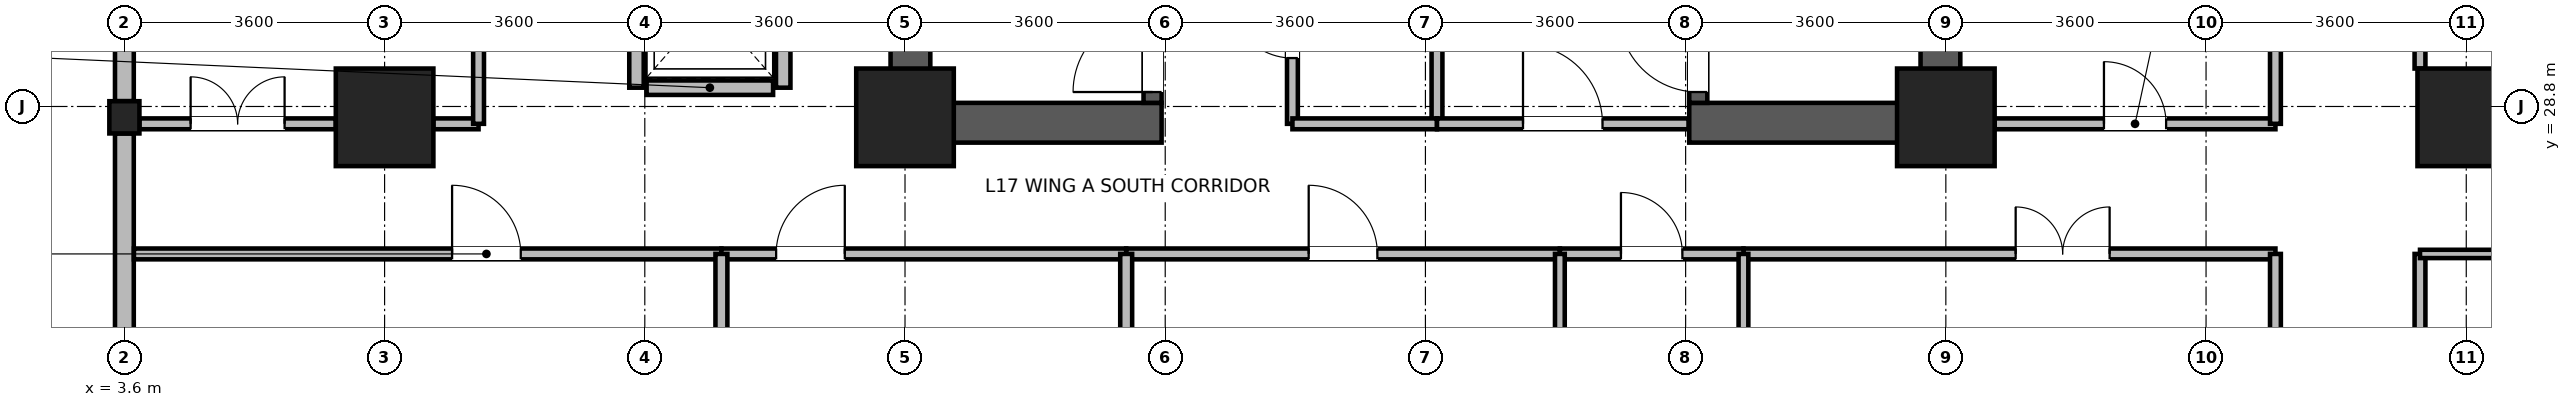
"""IFC4 building model, lengths in metres.
Left out: names, types, materials, properties, quantities, classifications, styles, units other than length and angle.
Written with IfcOpenShell. Run it as: python <this file> out.ifc"""

import sys

from ifc_helpers import new_model, si_unit, direction, frame, frame_2d, origin, origin_2d, place, context, subcontext, project, spatial, rectangle, i_section, extrude, source, transform, mapped, element, fill, save


model = new_model("IFC4")
c1 = context("Model", 3, precision=1e-05, world=origin(), true_north=direction((0.0, 1.0)))
c2 = subcontext(c1, "Body", "Model", "MODEL_VIEW")
j1 = project(units=[si_unit("LENGTHUNIT", "METRE"), si_unit("PLANEANGLEUNIT", "RADIAN")], contexts=[c1])
p1 = place(None, origin())
s1 = spatial("IfcSite", under=j1, at=p1, CompositionType="ELEMENT")
p2 = place(p1, origin())
s2 = spatial("IfcBuilding", under=s1, at=p2, CompositionType="ELEMENT")
p3 = place(p2, frame((0.0, 0.0, 69.7)))
s3 = spatial("IfcBuildingStorey", under=s2, at=p3, CompositionType="ELEMENT", Elevation=69.7)
for number, where, z_axis, x_axis in (
    (1, (14.475, 28.3, 0.0), (0.0, 0.0, 1.0), (0.0, 1.0, 0.0)),
    (2, (28.725, 28.3, 0.0), (0.0, 0.0, 1.0), (0.0, 1.0, 0.0)),
):
    element("IfcWall", number, at=place(p3, frame(where, z_axis=z_axis, x_axis=x_axis)), inside=s3, PredefinedType="SHEAR", context=c2, shape_type="SweptSolid", body=[
        extrude(rectangle(XDim=8.1, YDim=0.55, at=frame_2d((4.05, 0.0))), origin(), (0.0, 0.0, 1.0), 3.34),
    ])
for number, where, z_axis, x_axis in (
    (3, (14.75, 28.575, 0.0), (0.0, 0.0, 1.0), (1.0, 0.0, 0.0)),
    (4, (25.25, 28.575, 0.0), (0.0, 0.0, 1.0), (1.0, 0.0, 0.0)),
):
    element("IfcWall", number, at=place(p3, frame(where, z_axis=z_axis, x_axis=x_axis)), inside=s3, PredefinedType="SHEAR", context=c2, shape_type="SweptSolid", body=[
        extrude(rectangle(XDim=3.2, YDim=0.55, at=frame_2d((1.6, 0.0))), origin(), (0.0, 0.0, 1.0), 3.34),
    ])
p4 = place(p3, frame((17.825, 28.85, 0.0), z_axis=(0.0, 0.0, 1.0), x_axis=(0.0, 1.0, 0.0)))
e5 = element("IfcWall", 5, at=p4, inside=s3, PredefinedType="SHEAR", context=c2, shape_type="SweptSolid", body=[
    extrude(rectangle(XDim=7.0, YDim=0.25, at=frame_2d((3.5, 0.0))), origin(), (0.0, 0.0, 1.0), 3.34),
])
p5 = place(p4, frame((0.15, 0.0, 0.0)))
e6 = element("IfcOpeningElement", 6, at=p5, cuts=e5, PredefinedType="OPENING", context=c2, shape_type="SweptSolid", body=[
    extrude(rectangle(XDim=1.1, YDim=2.08, at=frame_2d((0.55, 1.04))), frame((0.0, 0.135, 0.0), z_axis=(0.0, -1.0, 0.0), x_axis=(1.0, 0.0, 0.0)), (0.0, 0.0, 1.0), 0.27),
])
p6 = place(p3, frame((25.375, 28.85, 0.0), z_axis=(0.0, 0.0, 1.0), x_axis=(0.0, 1.0, 0.0)))
e7 = element("IfcWall", 7, at=p6, inside=s3, PredefinedType="SHEAR", context=c2, shape_type="SweptSolid", body=[
    extrude(rectangle(XDim=7.0, YDim=0.25, at=frame_2d((3.5, 0.0))), origin(), (0.0, 0.0, 1.0), 3.34),
])
p7 = place(p6, frame((0.15, 0.0, 0.0)))
e8 = element("IfcOpeningElement", 8, at=p7, cuts=e7, PredefinedType="OPENING", context=c2, shape_type="SweptSolid", body=[
    extrude(rectangle(XDim=1.1, YDim=2.08, at=frame_2d((0.55, 1.04))), frame((0.0, 0.135, 0.0), z_axis=(0.0, -1.0, 0.0), x_axis=(1.0, 0.0, 0.0)), (0.0, 0.0, 1.0), 0.27),
])
m1 = source(origin(), c2, "Body", "SweptSolid", [
    extrude(rectangle(XDim=1.35, YDim=1.35, at=origin_2d()), origin(), (0.0, 0.0, 1.0), 3.7),
])
for number, where, z_axis, x_axis in (
    (9, (7.2, 28.65, 0.0), (0.0, 0.0, 1.0), (1.0, 0.0, 0.0)),
    (10, (14.4, 28.65, 0.0), (0.0, 0.0, 1.0), (1.0, 0.0, 0.0)),
    (11, (28.8, 28.65, 0.0), (0.0, 0.0, 1.0), (1.0, 0.0, 0.0)),
    (12, (36.0, 28.65, 0.0), (0.0, 0.0, 1.0), (1.0, 0.0, 0.0)),
):
    element("IfcColumn", number, at=place(p3, frame(where, z_axis=z_axis, x_axis=x_axis)), inside=s3, PredefinedType="COLUMN", context=c2, shape_type="MappedRepresentation", body=[
        mapped(m1, transform((0.0, 0.0, 0.0), x_axis=(1.0, 0.0, 0.0), y_axis=(0.0, 1.0, 0.0), z_axis=(0.0, 0.0, 1.0), scale=1.0)),
    ])
m2 = source(origin(), c2, "Body", "SweptSolid", [
    extrude(i_section(OverallWidth=0.416, OverallDepth=0.446, WebThickness=0.029, FlangeThickness=0.04, FilletRadius=0.015, at=origin_2d()), origin(), (0.0, 0.0, 1.0), 3.7),
])
p8 = place(p3, frame((3.6, 28.65, 0.0), z_axis=(0.0, 0.0, 1.0), x_axis=(1.0, 0.0, 0.0)))
e13 = element("IfcColumn", 13, at=p8, inside=s3, PredefinedType="COLUMN", context=c2, shape_type="MappedRepresentation", body=[
    mapped(m2, transform((0.0, 0.0, 0.0), x_axis=(1.0, 0.0, 0.0), y_axis=(0.0, 1.0, 0.0), z_axis=(0.0, 0.0, 1.0), scale=1.0)),
])
p9 = place(p3, frame((3.6, 28.874, 0.0), z_axis=(0.0, 0.0, 1.0), x_axis=(0.0, 1.0, 0.0)))
e14 = element("IfcWall", 14, at=p9, inside=s3, PredefinedType="STANDARD", context=c2, shape_type="SweptSolid", body=[
    extrude(rectangle(XDim=7.052, YDim=0.26, at=frame_2d((3.526, 0.0))), origin(), (0.0, 0.0, 1.0), 2.82),
])
p10 = place(p9, frame((1.013, 0.0, 0.85)))
e15 = element("IfcOpeningElement", 15, at=p10, cuts=e14, PredefinedType="OPENING", context=c2, shape_type="SweptSolid", body=[
    extrude(rectangle(XDim=1.5, YDim=1.85, at=frame_2d((0.75, 0.925))), frame((0.0, 0.14, 0.0), z_axis=(0.0, -1.0, 0.0), x_axis=(1.0, 0.0, 0.0)), (0.0, 0.0, 1.0), 0.28),
])
p11 = place(p9, frame((4.539, 0.0, 0.85)))
e16 = element("IfcOpeningElement", 16, at=p11, cuts=e14, PredefinedType="OPENING", context=c2, shape_type="SweptSolid", body=[
    extrude(rectangle(XDim=1.5, YDim=1.85, at=frame_2d((0.75, 0.925))), frame((0.0, 0.14, 0.0), z_axis=(0.0, -1.0, 0.0), x_axis=(1.0, 0.0, 0.0)), (0.0, 0.0, 1.0), 0.28),
])
p12 = place(p3, frame((3.6, 21.47, 0.0), z_axis=(0.0, 0.0, 1.0), x_axis=(0.0, 1.0, 0.0)))
e17 = element("IfcWall", 17, at=p12, inside=s3, PredefinedType="STANDARD", context=c2, shape_type="SweptSolid", body=[
    extrude(rectangle(XDim=6.956, YDim=0.26, at=frame_2d((3.478, 0.0))), origin(), (0.0, 0.0, 1.0), 3.32),
])
p13 = place(p12, frame((0.989, 0.0, 0.85)))
e18 = element("IfcOpeningElement", 18, at=p13, cuts=e17, PredefinedType="OPENING", context=c2, shape_type="SweptSolid", body=[
    extrude(rectangle(XDim=1.5, YDim=1.85, at=frame_2d((0.75, 0.925))), frame((0.0, 0.14, 0.0), z_axis=(0.0, -1.0, 0.0), x_axis=(1.0, 0.0, 0.0)), (0.0, 0.0, 1.0), 0.28),
])
p14 = place(p12, frame((3.003, 0.0, 0.85)))
e19 = element("IfcOpeningElement", 19, at=p14, cuts=e17, PredefinedType="OPENING", context=c2, shape_type="SweptSolid", body=[
    extrude(rectangle(XDim=0.95, YDim=1.75, at=frame_2d((0.475, 0.875))), frame((0.0, 0.14, 0.0), z_axis=(0.0, -1.0, 0.0), x_axis=(1.0, 0.0, 0.0)), (0.0, 0.0, 1.0), 0.28),
])
p15 = place(p3, frame((10.825, 29.06, 0.0), z_axis=(0.0, 0.0, 1.0), x_axis=(1.0, 0.0, 0.0)))
e20 = element("IfcWall", 20, at=p15, inside=s3, PredefinedType="PARTITIONING", context=c2, shape_type="SweptSolid", body=[
    extrude(rectangle(XDim=1.75, YDim=0.2, at=frame_2d((0.875, 0.0))), origin(), (0.0, 0.0, 1.0), 3.32),
])
for number, where, z_axis, x_axis in (
    (21, (10.685, 29.06, 0.0), (0.0, 0.0, 1.0), (0.0, 1.0, 0.0)),
    (22, (12.715, 29.06, 0.0), (0.0, 0.0, 1.0), (0.0, 1.0, 0.0)),
):
    element("IfcWall", number, at=place(p3, frame(where, z_axis=z_axis, x_axis=x_axis)), inside=s3, PredefinedType="PARTITIONING", context=c2, shape_type="SweptSolid", body=[
        extrude(rectangle(XDim=2.28, YDim=0.2, at=frame_2d((1.14, 0.0))), origin(), (0.0, 0.0, 1.0), 3.32),
    ])
p16 = place(p3, frame((35.36, 22.275, 0.0), z_axis=(0.0, 0.0, 1.0), x_axis=(0.0, 1.0, 0.0)))
e23 = element("IfcWall", 23, at=p16, inside=s3, PredefinedType="PARTITIONING", context=c2, shape_type="SweptSolid", body=[
    extrude(rectangle(XDim=4.485, YDim=0.15, at=frame_2d((2.243, 0.0))), origin(), (0.0, 0.0, 1.0), 3.32),
])
p17 = place(p3, frame((3.732, 26.76, 0.0), z_axis=(0.0, 0.0, 1.0), x_axis=(1.0, 0.0, 0.0)))
e24 = element("IfcWall", 24, at=p17, inside=s3, PredefinedType="PARTITIONING", context=c2, shape_type="SweptSolid", body=[
    extrude(rectangle(XDim=8.128, YDim=0.15, at=frame_2d((4.064, 0.0))), origin(), (0.0, 0.0, 1.0), 3.32),
])
p18 = place(p17, frame((4.402, 0.0, 0.0)))
e25 = element("IfcOpeningElement", 25, at=p18, cuts=e24, PredefinedType="OPENING", context=c2, shape_type="SweptSolid", body=[
    extrude(rectangle(XDim=0.95, YDim=2.1, at=frame_2d((0.475, 1.05))), frame((0.0, 0.085, 0.0), z_axis=(0.0, -1.0, 0.0), x_axis=(1.0, 0.0, 0.0)), (0.0, 0.0, 1.0), 0.17),
])
p19 = place(p3, frame((35.36, 29.325, 0.0), z_axis=(0.0, 0.0, 1.0), x_axis=(0.0, 1.0, 0.0)))
e26 = element("IfcWall", 26, at=p19, inside=s3, PredefinedType="PARTITIONING", context=c2, shape_type="SweptSolid", body=[
    extrude(rectangle(XDim=6.15, YDim=0.15, at=frame_2d((3.075, 0.0))), origin(), (0.0, 0.0, 1.0), 3.32),
])
p20 = place(p19, frame((2.425, 0.0, 0.0)))
e27 = element("IfcOpeningElement", 27, at=p20, cuts=e26, PredefinedType="OPENING", context=c2, shape_type="SweptSolid", body=[
    extrude(rectangle(XDim=1.3, YDim=2.12, at=frame_2d((0.65, 1.06))), frame((0.0, 0.085, 0.0), z_axis=(0.0, -1.0, 0.0), x_axis=(1.0, 0.0, 0.0)), (0.0, 0.0, 1.0), 0.17),
])
p21 = place(p3, frame((26.0, 26.76, 0.0), z_axis=(0.0, 0.0, 1.0), x_axis=(1.0, 0.0, 0.0)))
e28 = element("IfcWall", 28, at=p21, inside=s3, PredefinedType="PARTITIONING", context=c2, shape_type="SweptSolid", body=[
    extrude(rectangle(XDim=7.36, YDim=0.15, at=frame_2d((3.68, 0.0))), origin(), (0.0, 0.0, 1.0), 3.32),
])
p22 = place(p21, frame((3.766, 0.0, 0.0)))
e29 = element("IfcOpeningElement", 29, at=p22, cuts=e28, PredefinedType="OPENING", context=c2, shape_type="SweptSolid", body=[
    extrude(rectangle(XDim=1.3, YDim=2.12, at=frame_2d((0.65, 1.06))), frame((0.0, 0.085, 0.0), z_axis=(0.0, -1.0, 0.0), x_axis=(1.0, 0.0, 0.0)), (0.0, 0.0, 1.0), 0.17),
])
p23 = place(p3, frame((17.46, 26.76, 0.0), z_axis=(0.0, 0.0, 1.0), x_axis=(1.0, 0.0, 0.0)))
e30 = element("IfcWall", 30, at=p23, inside=s3, PredefinedType="PARTITIONING", context=c2, shape_type="SweptSolid", body=[
    extrude(rectangle(XDim=6.0, YDim=0.15, at=frame_2d((3.0, 0.0))), origin(), (0.0, 0.0, 1.0), 3.32),
])
p24 = place(p23, frame((2.525, 0.0, 0.0)))
e31 = element("IfcOpeningElement", 31, at=p24, cuts=e30, PredefinedType="OPENING", context=c2, shape_type="SweptSolid", body=[
    extrude(rectangle(XDim=0.95, YDim=2.1, at=frame_2d((0.475, 1.05))), frame((0.0, 0.085, 0.0), z_axis=(0.0, -1.0, 0.0), x_axis=(1.0, 0.0, 0.0)), (0.0, 0.0, 1.0), 0.17),
])
p25 = place(p3, frame((11.86, 26.76, 0.0), z_axis=(0.0, 0.0, 1.0), x_axis=(1.0, 0.0, 0.0)))
e32 = element("IfcWall", 32, at=p25, inside=s3, PredefinedType="PARTITIONING", context=c2, shape_type="SweptSolid", body=[
    extrude(rectangle(XDim=5.6, YDim=0.15, at=frame_2d((2.8, 0.0))), origin(), (0.0, 0.0, 1.0), 3.32),
])
p26 = place(p25, frame((0.757, 0.0, 0.0)))
e33 = element("IfcOpeningElement", 33, at=p26, cuts=e32, PredefinedType="OPENING", context=c2, shape_type="SweptSolid", body=[
    extrude(rectangle(XDim=0.95, YDim=2.1, at=frame_2d((0.475, 1.05))), frame((0.0, 0.085, 0.0), z_axis=(0.0, -1.0, 0.0), x_axis=(1.0, 0.0, 0.0)), (0.0, 0.0, 1.0), 0.17),
])
p27 = place(p3, frame((33.36, 21.6, 0.0), z_axis=(0.0, 0.0, 1.0), x_axis=(0.0, 1.0, 0.0)))
e34 = element("IfcWall", 34, at=p27, inside=s3, PredefinedType="PARTITIONING", context=c2, shape_type="SweptSolid", body=[
    extrude(rectangle(XDim=5.16, YDim=0.15, at=frame_2d((2.58, 0.0))), origin(), (0.0, 0.0, 1.0), 3.32),
])
p28 = place(p3, frame((3.808, 28.56, 0.0), z_axis=(0.0, 0.0, 1.0), x_axis=(1.0, 0.0, 0.0)))
e35 = element("IfcWall", 35, at=p28, inside=s3, PredefinedType="PARTITIONING", context=c2, shape_type="SweptSolid", body=[
    extrude(rectangle(XDim=2.717, YDim=0.15, at=frame_2d((1.358, 0.0))), origin(), (0.0, 0.0, 1.0), 2.67),
])
p29 = place(p28, frame((0.708, 0.0, 0.0)))
e36 = element("IfcOpeningElement", 36, at=p29, cuts=e35, PredefinedType="OPENING", context=c2, shape_type="SweptSolid", body=[
    extrude(rectangle(XDim=1.3, YDim=2.12, at=frame_2d((0.65, 1.06))), frame((0.0, 0.085, 0.0), z_axis=(0.0, -1.0, 0.0), x_axis=(1.0, 0.0, 0.0)), (0.0, 0.0, 1.0), 0.17),
])
p30 = place(p3, frame((7.875, 28.56, 0.0), z_axis=(0.0, 0.0, 1.0), x_axis=(1.0, 0.0, 0.0)))
e37 = element("IfcWall", 37, at=p30, inside=s3, PredefinedType="PARTITIONING", context=c2, shape_type="SweptSolid", body=[
    extrude(rectangle(XDim=0.625, YDim=0.15, at=frame_2d((0.312, 0.0))), origin(), (0.0, 0.0, 1.0), 2.67),
])
p31 = place(p3, frame((29.475, 28.56, 0.0), z_axis=(0.0, 0.0, 1.0), x_axis=(1.0, 0.0, 0.0)))
e38 = element("IfcWall", 38, at=p31, inside=s3, PredefinedType="PARTITIONING", context=c2, shape_type="SweptSolid", body=[
    extrude(rectangle(XDim=3.885, YDim=0.15, at=frame_2d((1.942, 0.0))), origin(), (0.0, 0.0, 1.0), 2.67),
])
p32 = place(p31, frame((1.512, 0.0, 0.0)))
e39 = element("IfcOpeningElement", 39, at=p32, cuts=e38, PredefinedType="OPENING", context=c2, shape_type="SweptSolid", body=[
    extrude(rectangle(XDim=0.86, YDim=2.02, at=frame_2d((0.43, 1.01))), frame((0.0, 0.085, 0.0), z_axis=(0.0, -1.0, 0.0), x_axis=(1.0, 0.0, 0.0)), (0.0, 0.0, 1.0), 0.17),
])
p33 = place(p3, frame((8.5, 28.56, 0.0), z_axis=(0.0, 0.0, 1.0), x_axis=(0.0, 1.0, 0.0)))
e40 = element("IfcWall", 40, at=p33, inside=s3, PredefinedType="PARTITIONING", context=c2, shape_type="SweptSolid", body=[
    extrude(rectangle(XDim=3.84, YDim=0.15, at=frame_2d((1.92, 0.0))), origin(), (0.0, 0.0, 1.0), 3.32),
])
p34 = place(p3, frame((33.36, 28.56, 0.0), z_axis=(0.0, 0.0, 1.0), x_axis=(0.0, 1.0, 0.0)))
e41 = element("IfcWall", 41, at=p34, inside=s3, PredefinedType="PARTITIONING", context=c2, shape_type="SweptSolid", body=[
    extrude(rectangle(XDim=3.08, YDim=0.15, at=frame_2d((1.54, 0.0))), origin(), (0.0, 0.0, 1.0), 3.32),
])
p35 = place(p3, frame((19.76, 28.56, 0.0), z_axis=(0.0, 0.0, 1.0), x_axis=(0.0, 1.0, 0.0)))
e42 = element("IfcWall", 42, at=p35, inside=s3, PredefinedType="PARTITIONING", context=c2, shape_type="SweptSolid", body=[
    extrude(rectangle(XDim=2.68, YDim=0.15, at=frame_2d((1.34, 0.0))), origin(), (0.0, 0.0, 1.0), 3.32),
])
p36 = place(p35, frame((0.91, 0.0, 0.0)))
e43 = element("IfcOpeningElement", 43, at=p36, cuts=e42, PredefinedType="OPENING", context=c2, shape_type="SweptSolid", body=[
    extrude(rectangle(XDim=0.86, YDim=2.02, at=frame_2d((0.43, 1.01))), frame((0.0, 0.085, 0.0), z_axis=(0.0, -1.0, 0.0), x_axis=(1.0, 0.0, 0.0)), (0.0, 0.0, 1.0), 0.17),
])
p37 = place(p3, frame((21.76, 28.56, 0.0), z_axis=(0.0, 0.0, 1.0), x_axis=(0.0, 1.0, 0.0)))
e44 = element("IfcWall", 44, at=p37, inside=s3, PredefinedType="PARTITIONING", context=c2, shape_type="SweptSolid", body=[
    extrude(rectangle(XDim=2.68, YDim=0.15, at=frame_2d((1.34, 0.0))), origin(), (0.0, 0.0, 1.0), 3.32),
])
p38 = place(p3, frame((23.46, 26.76, 0.0), z_axis=(0.0, 0.0, 1.0), x_axis=(1.0, 0.0, 0.0)))
e45 = element("IfcWall", 45, at=p38, inside=s3, PredefinedType="PARTITIONING", context=c2, shape_type="SweptSolid", body=[
    extrude(rectangle(XDim=2.54, YDim=0.15, at=frame_2d((1.27, 0.0))), origin(), (0.0, 0.0, 1.0), 3.32),
])
p39 = place(p38, frame((0.845, 0.0, 0.0)))
e46 = element("IfcOpeningElement", 46, at=p39, cuts=e45, PredefinedType="OPENING", context=c2, shape_type="SweptSolid", body=[
    extrude(rectangle(XDim=0.85, YDim=2.04, at=frame_2d((0.425, 1.02))), frame((0.0, 0.085, 0.0), z_axis=(0.0, -1.0, 0.0), x_axis=(1.0, 0.0, 0.0)), (0.0, 0.0, 1.0), 0.17),
])
p40 = place(p3, frame((19.76, 28.56, 0.0), z_axis=(0.0, 0.0, 1.0), x_axis=(1.0, 0.0, 0.0)))
e47 = element("IfcWall", 47, at=p40, inside=s3, PredefinedType="PARTITIONING", context=c2, shape_type="SweptSolid", body=[
    extrude(rectangle(XDim=2.0, YDim=0.15, at=frame_2d((1.0, 0.0))), origin(), (0.0, 0.0, 1.0), 2.12),
])
p41 = place(p3, frame((35.36, 26.76, 0.0), z_axis=(0.0, 0.0, 1.0), x_axis=(1.0, 0.0, 0.0)))
e48 = element("IfcWall", 48, at=p41, inside=s3, PredefinedType="PARTITIONING", context=c2, shape_type="SweptSolid", body=[
    extrude(rectangle(XDim=6.04, YDim=0.115, at=frame_2d((3.02, 0.0))), origin(), (0.0, 0.0, 1.0), 3.32),
])
p42 = place(p3, frame((17.46, 21.732, 0.0), z_axis=(0.0, 0.0, 1.0), x_axis=(0.0, 1.0, 0.0)))
e49 = element("IfcWall", 49, at=p42, inside=s3, PredefinedType="PARTITIONING", context=c2, shape_type="SweptSolid", body=[
    extrude(rectangle(XDim=5.028, YDim=0.165, at=frame_2d((2.514, 0.0))), origin(), (0.0, 0.0, 1.0), 3.32),
])
for number, where, z_axis, x_axis in (
    (50, (23.46, 21.732, 0.0), (0.0, 0.0, 1.0), (0.0, 1.0, 0.0)),
    (51, (26.0, 21.732, 0.0), (0.0, 0.0, 1.0), (0.0, 1.0, 0.0)),
):
    element("IfcWall", number, at=place(p3, frame(where, z_axis=z_axis, x_axis=x_axis)), inside=s3, PredefinedType="PARTITIONING", context=c2, shape_type="SweptSolid", body=[
        extrude(rectangle(XDim=5.028, YDim=0.135, at=frame_2d((2.514, 0.0))), origin(), (0.0, 0.0, 1.0), 3.32),
    ])
p43 = place(p3, frame((21.76, 28.56, 0.0), z_axis=(0.0, 0.0, 1.0), x_axis=(1.0, 0.0, 0.0)))
e52 = element("IfcWall", 52, at=p43, inside=s3, PredefinedType="PARTITIONING", context=c2, shape_type="SweptSolid", body=[
    extrude(rectangle(XDim=3.48, YDim=0.15, at=frame_2d((1.74, 0.0))), origin(), (0.0, 0.0, 1.0), 2.12),
])
p44 = place(p43, frame((1.19, 0.0, 0.0)))
e53 = element("IfcOpeningElement", 53, at=p44, cuts=e52, PredefinedType="OPENING", context=c2, shape_type="SweptSolid", body=[
    extrude(rectangle(XDim=1.1, YDim=2.08, at=frame_2d((0.55, 1.04))), frame((0.0, 0.085, 0.0), z_axis=(0.0, -1.0, 0.0), x_axis=(1.0, 0.0, 0.0)), (0.0, 0.0, 1.0), 0.17),
])
p45 = place(p3, frame((11.86, 23.5, 0.0), z_axis=(0.0, 0.0, 1.0), x_axis=(0.0, 1.0, 0.0)))
e54 = element("IfcWall", 54, at=p45, inside=s3, PredefinedType="PARTITIONING", context=c2, shape_type="SweptSolid", body=[
    extrude(rectangle(XDim=3.26, YDim=0.165, at=frame_2d((1.63, 0.0))), origin(), (0.0, 0.0, 1.0), 3.32),
])
p46 = place(p5, origin())
e55 = element("IfcDoor", 55, at=p46, inside=s3, OperationType="SINGLE_SWING_LEFT", PredefinedType="DOOR", context=c2, shape_type="SweptSolid", body=[
    extrude(rectangle(XDim=1.1, YDim=2.08, at=frame_2d((0.55, 1.04))), frame((0.0, 0.025, 0.0), z_axis=(0.0, -1.0, 0.0), x_axis=(1.0, 0.0, 0.0)), (0.0, 0.0, 1.0), 0.05),
])
fill(e6, e55)
p47 = place(p7, origin())
e56 = element("IfcDoor", 56, at=p47, inside=s3, OperationType="SINGLE_SWING_RIGHT", PredefinedType="DOOR", context=c2, shape_type="SweptSolid", body=[
    extrude(rectangle(XDim=1.1, YDim=2.08, at=frame_2d((0.55, 1.04))), frame((0.0, 0.025, 0.0), z_axis=(0.0, -1.0, 0.0), x_axis=(1.0, 0.0, 0.0)), (0.0, 0.0, 1.0), 0.05),
])
fill(e8, e56)
p48 = place(p18, origin())
e57 = element("IfcDoor", 57, at=p48, inside=s3, OperationType="SINGLE_SWING_LEFT", PredefinedType="DOOR", context=c2, shape_type="SweptSolid", body=[
    extrude(rectangle(XDim=0.95, YDim=2.1, at=frame_2d((0.475, 1.05))), frame((0.0, 0.025, 0.0), z_axis=(0.0, -1.0, 0.0), x_axis=(1.0, 0.0, 0.0)), (0.0, 0.0, 1.0), 0.05),
])
fill(e25, e57)
p49 = place(p22, origin())
e58 = element("IfcDoor", 58, at=p49, inside=s3, OperationType="DOUBLE_DOOR_SINGLE_SWING", PredefinedType="DOOR", context=c2, shape_type="SweptSolid", body=[
    extrude(rectangle(XDim=1.3, YDim=2.12, at=frame_2d((0.65, 1.06))), frame((0.0, 0.025, 0.0), z_axis=(0.0, -1.0, 0.0), x_axis=(1.0, 0.0, 0.0)), (0.0, 0.0, 1.0), 0.05),
])
fill(e29, e58)
p50 = place(p24, origin())
e59 = element("IfcDoor", 59, at=p50, inside=s3, OperationType="SINGLE_SWING_LEFT", PredefinedType="DOOR", context=c2, shape_type="SweptSolid", body=[
    extrude(rectangle(XDim=0.95, YDim=2.1, at=frame_2d((0.475, 1.05))), frame((0.0, 0.025, 0.0), z_axis=(0.0, -1.0, 0.0), x_axis=(1.0, 0.0, 0.0)), (0.0, 0.0, 1.0), 0.05),
])
fill(e31, e59)
p51 = place(p26, origin())
e60 = element("IfcDoor", 60, at=p51, inside=s3, OperationType="SINGLE_SWING_RIGHT", PredefinedType="DOOR", context=c2, shape_type="SweptSolid", body=[
    extrude(rectangle(XDim=0.95, YDim=2.1, at=frame_2d((0.475, 1.05))), frame((0.0, 0.025, 0.0), z_axis=(0.0, -1.0, 0.0), x_axis=(1.0, 0.0, 0.0)), (0.0, 0.0, 1.0), 0.05),
])
fill(e33, e60)
p52 = place(p29, origin())
e61 = element("IfcDoor", 61, at=p52, inside=s3, OperationType="DOUBLE_DOOR_SINGLE_SWING", PredefinedType="DOOR", context=c2, shape_type="SweptSolid", body=[
    extrude(rectangle(XDim=1.3, YDim=2.12, at=frame_2d((0.65, 1.06))), frame((0.0, 0.025, 0.0), z_axis=(0.0, -1.0, 0.0), x_axis=(1.0, 0.0, 0.0)), (0.0, 0.0, 1.0), 0.05),
])
fill(e36, e61)
p53 = place(p32, origin())
e62 = element("IfcDoor", 62, at=p53, inside=s3, OperationType="SINGLE_SWING_LEFT", PredefinedType="DOOR", context=c2, shape_type="SweptSolid", body=[
    extrude(rectangle(XDim=0.86, YDim=2.02, at=frame_2d((0.43, 1.01))), frame((0.0, 0.025, 0.0), z_axis=(0.0, -1.0, 0.0), x_axis=(1.0, 0.0, 0.0)), (0.0, 0.0, 1.0), 0.05),
])
fill(e39, e62)
p54 = place(p36, origin())
e63 = element("IfcDoor", 63, at=p54, inside=s3, OperationType="SINGLE_SWING_RIGHT", PredefinedType="DOOR", context=c2, shape_type="SweptSolid", body=[
    extrude(rectangle(XDim=0.86, YDim=2.02, at=frame_2d((0.43, 1.01))), frame((0.0, 0.025, 0.0), z_axis=(0.0, -1.0, 0.0), x_axis=(1.0, 0.0, 0.0)), (0.0, 0.0, 1.0), 0.05),
])
fill(e43, e63)
p55 = place(p39, origin())
e64 = element("IfcDoor", 64, at=p55, inside=s3, OperationType="SINGLE_SWING_LEFT", PredefinedType="DOOR", context=c2, shape_type="SweptSolid", body=[
    extrude(rectangle(XDim=0.85, YDim=2.04, at=frame_2d((0.425, 1.02))), frame((0.0, 0.025, 0.0), z_axis=(0.0, -1.0, 0.0), x_axis=(1.0, 0.0, 0.0)), (0.0, 0.0, 1.0), 0.05),
])
fill(e46, e64)
p56 = place(p44, origin())
e65 = element("IfcDoor", 65, at=p56, inside=s3, OperationType="SINGLE_SWING_LEFT", PredefinedType="DOOR", context=c2, shape_type="SweptSolid", body=[
    extrude(rectangle(XDim=1.1, YDim=2.08, at=frame_2d((0.55, 1.04))), frame((0.0, 0.025, 0.0), z_axis=(0.0, -1.0, 0.0), x_axis=(1.0, 0.0, 0.0)), (0.0, 0.0, 1.0), 0.05),
])
fill(e53, e65)
save(model, sys.argv[1])
